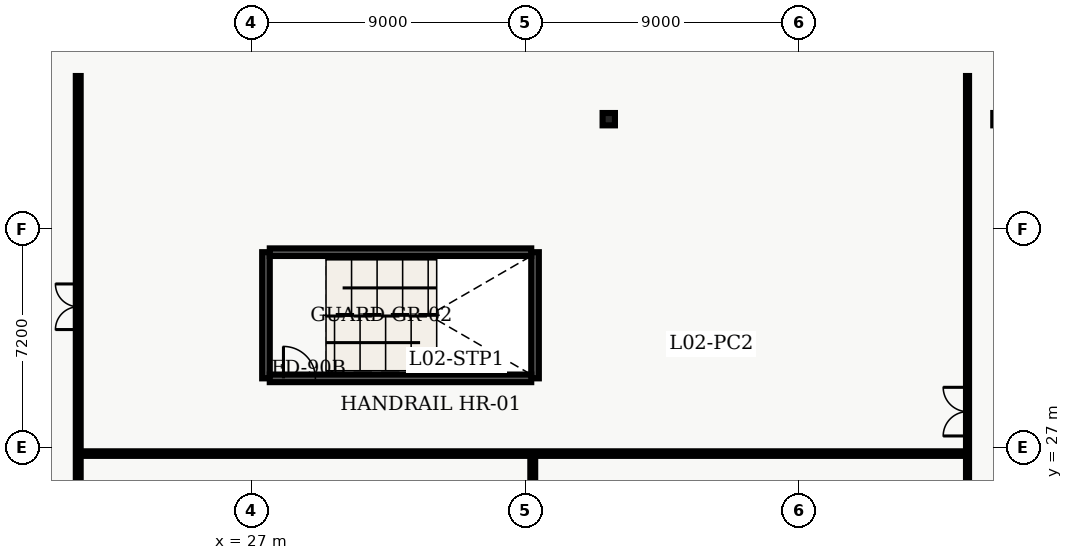
"""IFC4 building model, lengths in metres.
Left out: names, types, materials, properties, quantities, classifications, styles, units other than length and angle.
Written with IfcOpenShell. Run it as: python <this file> out.ifc"""

import sys

from ifc_helpers import new_model, entity, si_unit, converted_unit, direction, frame, origin_with_axes, origin_2d_with_axis, place, context, subcontext, project, spatial, polyline, rectangle, hollow_rectangle, outline, extrude, element, fill, save


model = new_model("IFC4")
c1 = context("Model", 3, precision=1e-05, world=origin_with_axes(), true_north=direction((0.0, 1.0)))
c2 = subcontext(c1, "Body", "Model", "MODEL_VIEW")
j1 = project(units=[si_unit("LENGTHUNIT", "METRE"), converted_unit("PLANEANGLEUNIT", "DEGREE", entity("IfcPlaneAngleMeasure", 0.017), si_unit("PLANEANGLEUNIT", "RADIAN"), dimensions=[0, 0, 0, 0, 0, 0, 0])], contexts=[c1])
p1 = place(None, origin_with_axes())
s1 = spatial("IfcSite", under=j1, at=p1, CompositionType="ELEMENT")
p2 = place(p1, origin_with_axes())
s2 = spatial("IfcBuilding", under=s1, at=p2, CompositionType="ELEMENT")
p3 = place(p2, frame((0.0, 0.0, 10.8), z_axis=(0.0, 0.0, 1.0), x_axis=(1.0, 0.0, 0.0)))
s3 = spatial("IfcBuildingStorey", under=s2, at=p3, CompositionType="ELEMENT", Elevation=10.8)
for number, where, z_axis, x_axis in (
    (1, (27.475, 29.275, 0.0), (0.0, 0.0, 1.0), (0.0, 1.0, 0.0)),
    (2, (36.325, 29.275, 0.0), (0.0, 0.0, 1.0), (0.0, 1.0, 0.0)),
):
    element("IfcWall", number, at=place(p3, frame(where, z_axis=z_axis, x_axis=x_axis)), inside=s3, PredefinedType="SHEAR", context=c2, shape_type="SweptSolid", body=[
        extrude(outline(polyline([(0.0, -0.125), (4.15, -0.125), (4.15, 0.125), (0.0, 0.125), (0.0, -0.125)])), origin_with_axes(), (0.0, 0.0, 1.0), 4.26),
    ])
p4 = place(p3, frame((27.6, 29.275, 0.0), z_axis=(0.0, 0.0, 1.0), x_axis=(1.0, 0.0, 0.0)))
e3 = element("IfcWall", 3, at=p4, inside=s3, PredefinedType="SHEAR", context=c2, shape_type="SweptSolid", body=[
    extrude(outline(polyline([(0.0, -0.125), (8.6, -0.125), (8.6, 0.125), (0.0, 0.125), (0.0, -0.125)])), origin_with_axes(), (0.0, 0.0, 1.0), 4.26),
])
p5 = place(p4, frame((0.975, 0.0, 0.0), z_axis=(0.0, 0.0, 1.0), x_axis=(1.0, 0.0, 0.0)))
e4 = element("IfcOpeningElement", 4, at=p5, cuts=e3, PredefinedType="OPENING", context=c2, shape_type="SweptSolid", body=[
    extrude(rectangle(XDim=1.05, YDim=0.27, at=origin_2d_with_axis()), origin_with_axes(), (0.0, 0.0, 1.0), 2.15),
])
p6 = place(p3, frame((27.6, 33.425, 0.0), z_axis=(0.0, 0.0, 1.0), x_axis=(1.0, 0.0, 0.0)))
e5 = element("IfcWall", 5, at=p6, inside=s3, PredefinedType="SHEAR", context=c2, shape_type="SweptSolid", body=[
    extrude(outline(polyline([(0.0, -0.125), (8.6, -0.125), (8.6, 0.125), (0.0, 0.125), (0.0, -0.125)])), origin_with_axes(), (0.0, 0.0, 1.0), 4.26),
])
for number, where, z_axis, x_axis in (
    (6, (38.75, 37.8, 0.0), (0.0, 0.0, 1.0), (1.0, 0.0, 0.0)),
    (7, (51.6, 37.8, 0.0), (0.0, 0.0, 1.0), (1.0, 0.0, 0.0)),
):
    element("IfcColumn", number, at=place(p3, frame(where, z_axis=z_axis, x_axis=x_axis)), inside=s3, PredefinedType="COLUMN", context=c2, shape_type="SweptSolid", body=[
        extrude(hollow_rectangle(XDim=0.406, YDim=0.406, WallThickness=0.015, InnerFilletRadius=0.015, OuterFilletRadius=0.03, at=origin_2d_with_axis()), origin_with_axes(), (0.0, 0.0, 1.0), 4.5),
    ])
p7 = place(p3, frame((21.3, 0.38, 0.0), z_axis=(0.0, 0.0, 1.0), x_axis=(0.0, 1.0, 0.0)))
e8 = element("IfcWall", 8, at=p7, inside=s3, PredefinedType="PARTITIONING", context=c2, shape_type="SweptSolid", body=[
    extrude(outline(polyline([(0.0, -0.08), (38.84, -0.08), (38.84, 0.08), (0.0, 0.08), (0.0, -0.08)])), origin_with_axes(), (0.0, 0.0, 1.0), 3.2),
])
p8 = place(p7, frame((13.025, 0.0, 0.0), z_axis=(0.0, 0.0, 1.0), x_axis=(1.0, 0.0, 0.0)))
e9 = element("IfcOpeningElement", 9, at=p8, cuts=e8, PredefinedType="OPENING", context=c2, shape_type="SweptSolid", body=[
    extrude(rectangle(XDim=1.05, YDim=0.18, at=origin_2d_with_axis()), origin_with_axes(), (0.0, 0.0, 1.0), 2.15),
])
p9 = place(p7, frame((31.25, 0.0, 0.0), z_axis=(0.0, 0.0, 1.0), x_axis=(1.0, 0.0, 0.0)))
e10 = element("IfcOpeningElement", 10, at=p9, cuts=e8, PredefinedType="OPENING", context=c2, shape_type="SweptSolid", body=[
    extrude(rectangle(XDim=1.5, YDim=0.18, at=origin_2d_with_axis()), origin_with_axes(), (0.0, 0.0, 1.0), 2.2),
])
p10 = place(p3, frame((36.25, 4.3, 0.0), z_axis=(0.0, 0.0, 1.0), x_axis=(0.0, 1.0, 0.0)))
e11 = element("IfcWall", 11, at=p10, inside=s3, PredefinedType="PARTITIONING", context=c2, shape_type="SweptSolid", body=[
    extrude(outline(polyline([(0.0, -0.08), (22.5, -0.08), (22.5, 0.08), (0.0, 0.08), (0.0, -0.08)])), origin_with_axes(), (0.0, 0.0, 1.0), 3.2),
])
p11 = place(p3, frame((50.55, 0.38, 0.0), z_axis=(0.0, 0.0, 1.0), x_axis=(0.0, 1.0, 0.0)))
e12 = element("IfcWall", 12, at=p11, inside=s3, PredefinedType="PARTITIONING", context=c2, shape_type="SweptSolid", body=[
    extrude(outline(polyline([(0.0, -0.05), (38.84, -0.05), (38.84, 0.05), (0.0, 0.05), (0.0, -0.05)])), origin_with_axes(), (0.0, 0.0, 1.0), 3.2),
])
p12 = place(p11, frame((12.8, 0.0, 0.0), z_axis=(0.0, 0.0, 1.0), x_axis=(1.0, 0.0, 0.0)))
e13 = element("IfcOpeningElement", 13, at=p12, cuts=e12, PredefinedType="OPENING", context=c2, shape_type="SweptSolid", body=[
    extrude(rectangle(XDim=1.6, YDim=0.12, at=origin_2d_with_axis()), origin_with_axes(), (0.0, 0.0, 1.0), 2.2),
])
p13 = place(p11, frame((27.8, 0.0, 0.0), z_axis=(0.0, 0.0, 1.0), x_axis=(1.0, 0.0, 0.0)))
e14 = element("IfcOpeningElement", 14, at=p13, cuts=e12, PredefinedType="OPENING", context=c2, shape_type="SweptSolid", body=[
    extrude(rectangle(XDim=1.6, YDim=0.12, at=origin_2d_with_axis()), origin_with_axes(), (0.0, 0.0, 1.0), 2.2),
])
p14 = place(p3, frame((21.3, 26.8, 0.0), z_axis=(0.0, 0.0, 1.0), x_axis=(1.0, 0.0, 0.0)))
e15 = element("IfcWall", 15, at=p14, inside=s3, PredefinedType="PARTITIONING", context=c2, shape_type="SweptSolid", body=[
    extrude(outline(polyline([(0.0, -0.075), (29.25, -0.075), (29.25, 0.075), (0.0, 0.075), (0.0, -0.075)])), origin_with_axes(), (0.0, 0.0, 1.0), 3.2),
])
p15 = place(p4, frame((0.975, 0.0, 0.0), z_axis=(0.0, 0.0, 1.0), x_axis=(1.0, 0.0, 0.0)))
e16 = element("IfcDoor", 16, at=p15, inside=s3, OperationType="SINGLE_SWING_LEFT", PredefinedType="DOOR", context=c2, shape_type="SweptSolid", body=[
    extrude(rectangle(XDim=1.05, YDim=0.09, at=origin_2d_with_axis()), origin_with_axes(), (0.0, 0.0, 1.0), 2.15),
])
fill(e4, e16)
p16 = place(p7, frame((31.25, 0.0, 0.0), z_axis=(0.0, 0.0, 1.0), x_axis=(1.0, 0.0, 0.0)))
e17 = element("IfcDoor", 17, at=p16, inside=s3, OperationType="DOUBLE_DOOR_SINGLE_SWING", PredefinedType="DOOR", context=c2, shape_type="SweptSolid", body=[
    extrude(rectangle(XDim=1.5, YDim=0.09, at=origin_2d_with_axis()), origin_with_axes(), (0.0, 0.0, 1.0), 2.2),
])
fill(e10, e17)
p17 = place(p11, frame((27.8, 0.0, 0.0), z_axis=(0.0, 0.0, 1.0), x_axis=(1.0, 0.0, 0.0)))
e18 = element("IfcDoor", 18, at=p17, inside=s3, OperationType="DOUBLE_DOOR_SINGLE_SWING", PredefinedType="DOOR", context=c2, shape_type="SweptSolid", body=[
    extrude(rectangle(XDim=1.6, YDim=0.06, at=origin_2d_with_axis()), origin_with_axes(), (0.0, 0.0, 1.0), 2.2),
])
fill(e14, e18)
save(model, sys.argv[1])
